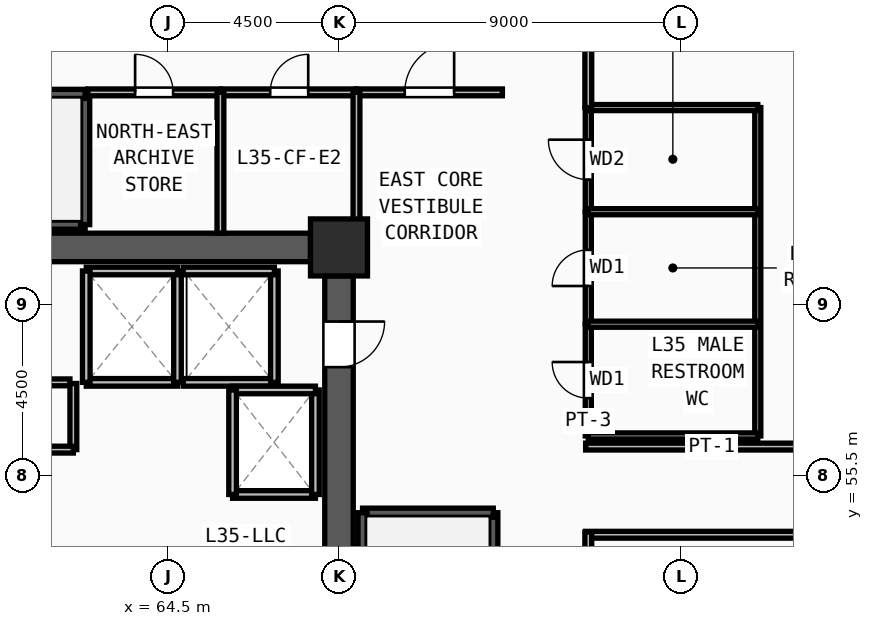
"""IFC4 building model, lengths in metres.
Left out: names, types, materials, properties, quantities, classifications, styles, units other than length and angle.
Written with IfcOpenShell. Run it as: python <this file> out.ifc"""

import sys

from ifc_helpers import new_model, si_unit, direction, frame, frame_2d, origin, origin_2d, place, context, subcontext, project, spatial, rectangle, extrude, source, transform, mapped, element, fill, save


model = new_model("IFC4")
c1 = context("Model", 3, precision=1e-05, world=origin(), true_north=direction((0.0, 1.0)))
c2 = subcontext(c1, "Body", "Model", "MODEL_VIEW")
j1 = project(units=[si_unit("LENGTHUNIT", "METRE"), si_unit("PLANEANGLEUNIT", "RADIAN")], contexts=[c1])
p1 = place(None, origin())
s1 = spatial("IfcSite", under=j1, at=p1, CompositionType="ELEMENT")
p2 = place(p1, origin())
s2 = spatial("IfcBuilding", under=s1, at=p2, CompositionType="ELEMENT")
p3 = place(p2, frame((0.0, 0.0, 135.75)))
s3 = spatial("IfcBuildingStorey", under=s2, at=p3, CompositionType="ELEMENT", Elevation=135.75)
m1 = source(origin(), c2, "Body", "SweptSolid", [
    extrude(rectangle(XDim=1.5, YDim=1.5, at=origin_2d()), origin(), (0.0, 0.0, 1.0), 3.75),
])
p4 = place(p3, frame((69.0, 61.5, 0.0), z_axis=(0.0, 0.0, 1.0), x_axis=(1.0, 0.0, 0.0)))
e1 = element("IfcColumn", 1, at=p4, inside=s3, PredefinedType="COLUMN", context=c2, shape_type="MappedRepresentation", body=[
    mapped(m1, transform((0.0, 0.0, 0.0), x_axis=(1.0, 0.0, 0.0), y_axis=(0.0, 1.0, 0.0), z_axis=(0.0, 0.0, 1.0), scale=1.0)),
])
p5 = place(p3, frame((60.75, 61.5, 0.0), z_axis=(0.0, 0.0, 1.0), x_axis=(1.0, 0.0, 0.0)))
e2 = element("IfcWall", 2, at=p5, inside=s3, PredefinedType="SHEAR", context=c2, shape_type="SweptSolid", body=[
    extrude(rectangle(XDim=7.5, YDim=0.75, at=frame_2d((3.75, 0.0))), origin(), (0.0, 0.0, 1.0), 3.47),
])
p6 = place(p3, frame((69.0, 60.75, 0.0), z_axis=(0.0, 0.0, 1.0), x_axis=(0.0, -1.0, 0.0)))
e3 = element("IfcWall", 3, at=p6, inside=s3, PredefinedType="SHEAR", context=c2, shape_type="SweptSolid", body=[
    extrude(rectangle(XDim=13.5, YDim=0.75, at=frame_2d((6.75, 0.0))), origin(), (0.0, 0.0, 1.0), 3.47),
])
m2 = source(origin(), c2, "Body", "SweptSolid", [
    extrude(rectangle(XDim=1.2, YDim=2.2, at=frame_2d((0.6, 1.1))), frame((0.0, 0.385, 0.0), z_axis=(0.0, -1.0, 0.0), x_axis=(1.0, 0.0, 0.0)), (0.0, 0.0, 1.0), 0.77),
])
p7 = place(p6, frame((1.2, 0.0, 0.0)))
e4 = element("IfcOpeningElement", 4, at=p7, cuts=e3, PredefinedType="OPENING", context=c2, shape_type="MappedRepresentation", body=[
    mapped(m2, transform((0.0, 0.0, 0.0), x_axis=(1.0, 0.0, 0.0), y_axis=(0.0, 1.0, 0.0), z_axis=(0.0, 0.0, 1.0), scale=1.0)),
])
p8 = place(p3, frame((73.06, 46.7, 0.0), z_axis=(0.0, 0.0, 1.0), x_axis=(0.0, 1.0, 0.0)))
e5 = element("IfcWall", 5, at=p8, inside=s3, PredefinedType="SOLIDWALL", context=c2, shape_type="SweptSolid", body=[
    extrude(rectangle(XDim=7.82, YDim=0.24, at=frame_2d((3.91, 0.0))), origin(), (0.0, 0.0, 1.0), 3.47),
])
m3 = source(origin(), c2, "Body", "SweptSolid", [
    extrude(rectangle(XDim=1.2, YDim=2.2, at=frame_2d((0.6, 1.1))), frame((0.0, 0.13, 0.0), z_axis=(0.0, -1.0, 0.0), x_axis=(1.0, 0.0, 0.0)), (0.0, 0.0, 1.0), 0.26),
])
p9 = place(p8, frame((0.32, 0.0, 0.0)))
e6 = element("IfcOpeningElement", 6, at=p9, cuts=e5, PredefinedType="OPENING", context=c2, shape_type="MappedRepresentation", body=[
    mapped(m3, transform((0.0, 0.0, 0.0), x_axis=(1.0, 0.0, 0.0), y_axis=(0.0, 1.0, 0.0), z_axis=(0.0, 0.0, 1.0), scale=1.0)),
])
p10 = place(p3, frame((73.06, 54.52, 0.0), z_axis=(0.0, 0.0, 1.0), x_axis=(-1.0, 0.0, 0.0)))
e7 = element("IfcWall", 7, at=p10, inside=s3, PredefinedType="SOLIDWALL", context=c2, shape_type="SweptSolid", body=[
    extrude(rectangle(XDim=3.44, YDim=0.24, at=frame_2d((1.72, 0.0))), origin(), (0.0, 0.0, 1.0), 3.47),
])
for number, where, z_axis, x_axis in (
    (8, (69.62, 54.52, 0.0), (0.0, 0.0, 1.0), (0.0, -1.0, 0.0)),
    (9, (54.5, 62.1, 0.0), (0.0, 0.0, 1.0), (1.0, 0.0, 0.0)),
):
    element("IfcWall", number, at=place(p3, frame(where, z_axis=z_axis, x_axis=x_axis)), inside=s3, PredefinedType="SOLIDWALL", context=c2, shape_type="SweptSolid", body=[
        extrude(rectangle(XDim=7.82, YDim=0.24, at=frame_2d((3.91, 0.0))), origin(), (0.0, 0.0, 1.0), 3.47),
    ])
p11 = place(p3, frame((62.32, 62.1, 0.0), z_axis=(0.0, 0.0, 1.0), x_axis=(0.0, 1.0, 0.0)))
e10 = element("IfcWall", 10, at=p11, inside=s3, PredefinedType="SOLIDWALL", context=c2, shape_type="SweptSolid", body=[
    extrude(rectangle(XDim=3.44, YDim=0.24, at=frame_2d((1.72, 0.0))), origin(), (0.0, 0.0, 1.0), 3.47),
])
p12 = place(p3, frame((62.32, 65.54, 0.0), z_axis=(0.0, 0.0, 1.0), x_axis=(-1.0, 0.0, 0.0)))
e11 = element("IfcWall", 11, at=p12, inside=s3, PredefinedType="SOLIDWALL", context=c2, shape_type="SweptSolid", body=[
    extrude(rectangle(XDim=7.82, YDim=0.24, at=frame_2d((3.91, 0.0))), origin(), (0.0, 0.0, 1.0), 3.47),
])
p13 = place(p12, frame((6.3, 0.0, 0.0)))
e12 = element("IfcOpeningElement", 12, at=p13, cuts=e11, PredefinedType="OPENING", context=c2, shape_type="MappedRepresentation", body=[
    mapped(m3, transform((0.0, 0.0, 0.0), x_axis=(1.0, 0.0, 0.0), y_axis=(0.0, 1.0, 0.0), z_axis=(0.0, 0.0, 1.0), scale=1.0)),
])
p14 = place(p3, frame((62.35, 57.95, 0.0), z_axis=(0.0, 0.0, 1.0), x_axis=(1.0, 0.0, 0.0)))
e13 = element("IfcWall", 13, at=p14, inside=s3, PredefinedType="SOLIDWALL", context=c2, shape_type="SweptSolid", body=[
    extrude(rectangle(XDim=2.4, YDim=0.2, at=frame_2d((1.2, 0.0))), origin(), (0.0, 0.0, 1.0), 3.47),
])
p15 = place(p3, frame((64.75, 57.95, 0.0), z_axis=(0.0, 0.0, 1.0), x_axis=(0.0, 1.0, 0.0)))
e14 = element("IfcWall", 14, at=p15, inside=s3, PredefinedType="SOLIDWALL", context=c2, shape_type="SweptSolid", body=[
    extrude(rectangle(XDim=2.93, YDim=0.2, at=frame_2d((1.465, 0.0))), origin(), (0.0, 0.0, 1.0), 3.47),
])
p16 = place(p3, frame((64.75, 60.88, 0.0), z_axis=(0.0, 0.0, 1.0), x_axis=(-1.0, 0.0, 0.0)))
e15 = element("IfcWall", 15, at=p16, inside=s3, PredefinedType="SOLIDWALL", context=c2, shape_type="SweptSolid", body=[
    extrude(rectangle(XDim=2.4, YDim=0.2, at=frame_2d((1.2, 0.0))), origin(), (0.0, 0.0, 1.0), 3.47),
])
p17 = place(p3, frame((62.35, 60.88, 0.0), z_axis=(0.0, 0.0, 1.0), x_axis=(0.0, -1.0, 0.0)))
e16 = element("IfcWall", 16, at=p17, inside=s3, PredefinedType="SOLIDWALL", context=c2, shape_type="SweptSolid", body=[
    extrude(rectangle(XDim=2.93, YDim=0.2, at=frame_2d((1.465, 0.0))), origin(), (0.0, 0.0, 1.0), 3.47),
])
p18 = place(p3, frame((64.9, 57.95, 0.0), z_axis=(0.0, 0.0, 1.0), x_axis=(1.0, 0.0, 0.0)))
e17 = element("IfcWall", 17, at=p18, inside=s3, PredefinedType="SOLIDWALL", context=c2, shape_type="SweptSolid", body=[
    extrude(rectangle(XDim=2.4, YDim=0.2, at=frame_2d((1.2, 0.0))), origin(), (0.0, 0.0, 1.0), 3.47),
])
p19 = place(p3, frame((67.3, 57.95, 0.0), z_axis=(0.0, 0.0, 1.0), x_axis=(0.0, 1.0, 0.0)))
e18 = element("IfcWall", 18, at=p19, inside=s3, PredefinedType="SOLIDWALL", context=c2, shape_type="SweptSolid", body=[
    extrude(rectangle(XDim=2.93, YDim=0.2, at=frame_2d((1.465, 0.0))), origin(), (0.0, 0.0, 1.0), 3.47),
])
p20 = place(p3, frame((67.3, 60.88, 0.0), z_axis=(0.0, 0.0, 1.0), x_axis=(-1.0, 0.0, 0.0)))
e19 = element("IfcWall", 19, at=p20, inside=s3, PredefinedType="SOLIDWALL", context=c2, shape_type="SweptSolid", body=[
    extrude(rectangle(XDim=2.4, YDim=0.2, at=frame_2d((1.2, 0.0))), origin(), (0.0, 0.0, 1.0), 3.47),
])
p21 = place(p3, frame((66.2, 55.0, 0.0), z_axis=(0.0, 0.0, 1.0), x_axis=(1.0, 0.0, 0.0)))
e20 = element("IfcWall", 20, at=p21, inside=s3, PredefinedType="SOLIDWALL", context=c2, shape_type="SweptSolid", body=[
    extrude(rectangle(XDim=2.18, YDim=0.2, at=frame_2d((1.09, 0.0))), origin(), (0.0, 0.0, 1.0), 3.47),
])
p22 = place(p3, frame((68.38, 55.0, 0.0), z_axis=(0.0, 0.0, 1.0), x_axis=(0.0, 1.0, 0.0)))
e21 = element("IfcWall", 21, at=p22, inside=s3, PredefinedType="SOLIDWALL", context=c2, shape_type="SweptSolid", body=[
    extrude(rectangle(XDim=2.75, YDim=0.2, at=frame_2d((1.375, 0.0))), origin(), (0.0, 0.0, 1.0), 3.47),
])
p23 = place(p3, frame((68.38, 57.75, 0.0), z_axis=(0.0, 0.0, 1.0), x_axis=(-1.0, 0.0, 0.0)))
e22 = element("IfcWall", 22, at=p23, inside=s3, PredefinedType="SOLIDWALL", context=c2, shape_type="SweptSolid", body=[
    extrude(rectangle(XDim=2.18, YDim=0.2, at=frame_2d((1.09, 0.0))), origin(), (0.0, 0.0, 1.0), 3.47),
])
p24 = place(p3, frame((66.2, 57.75, 0.0), z_axis=(0.0, 0.0, 1.0), x_axis=(0.0, -1.0, 0.0)))
e23 = element("IfcWall", 23, at=p24, inside=s3, PredefinedType="SOLIDWALL", context=c2, shape_type="SweptSolid", body=[
    extrude(rectangle(XDim=2.75, YDim=0.2, at=frame_2d((1.375, 0.0))), origin(), (0.0, 0.0, 1.0), 3.47),
])
p25 = place(p3, frame((59.81, 57.95, 0.0), z_axis=(0.0, 0.0, 1.0), x_axis=(1.0, 0.0, 0.0)))
e24 = element("IfcWall", 24, at=p25, inside=s3, PredefinedType="PARTITIONING", context=c2, shape_type="SweptSolid", body=[
    extrude(rectangle(XDim=2.11, YDim=0.18, at=frame_2d((1.055, 0.0))), origin(), (0.0, 0.0, 1.0), 3.47),
])
m4 = source(origin(), c2, "Body", "SweptSolid", [
    extrude(rectangle(XDim=0.85, YDim=2.1, at=frame_2d((0.425, 1.05))), frame((0.0, 0.1, 0.0), z_axis=(0.0, -1.0, 0.0), x_axis=(1.0, 0.0, 0.0)), (0.0, 0.0, 1.0), 0.2),
])
p26 = place(p25, frame((0.635, 0.0, 0.0)))
e25 = element("IfcOpeningElement", 25, at=p26, cuts=e24, PredefinedType="OPENING", context=c2, shape_type="MappedRepresentation", body=[
    mapped(m4, transform((0.0, 0.0, 0.0), x_axis=(1.0, 0.0, 0.0), y_axis=(0.0, 1.0, 0.0), z_axis=(0.0, 0.0, 1.0), scale=1.0)),
])
p27 = place(p3, frame((75.56, 56.54, 0.0), z_axis=(0.0, 0.0, 1.0), x_axis=(0.0, 1.0, 0.0)))
e26 = element("IfcWall", 26, at=p27, inside=s3, PredefinedType="PARTITIONING", context=c2, shape_type="SweptSolid", body=[
    extrude(rectangle(XDim=2.94, YDim=0.16, at=frame_2d((1.47, 0.0))), origin(), (0.0, 0.0, 1.0), 3.47),
])
m5 = source(origin(), c2, "Body", "SweptSolid", [
    extrude(rectangle(XDim=0.95, YDim=2.15, at=frame_2d((0.475, 1.075))), frame((0.0, 0.09, 0.0), z_axis=(0.0, -1.0, 0.0), x_axis=(1.0, 0.0, 0.0)), (0.0, 0.0, 1.0), 0.18),
])
p28 = place(p27, frame((0.995, 0.0, 0.0)))
e27 = element("IfcOpeningElement", 27, at=p28, cuts=e26, PredefinedType="OPENING", context=c2, shape_type="MappedRepresentation", body=[
    mapped(m5, transform((0.0, 0.0, 0.0), x_axis=(1.0, 0.0, 0.0), y_axis=(0.0, 1.0, 0.0), z_axis=(0.0, 0.0, 1.0), scale=1.0)),
])
p29 = place(p3, frame((75.56, 59.48, 0.0), z_axis=(0.0, 0.0, 1.0), x_axis=(0.0, 1.0, 0.0)))
e28 = element("IfcWall", 28, at=p29, inside=s3, PredefinedType="PARTITIONING", context=c2, shape_type="SweptSolid", body=[
    extrude(rectangle(XDim=2.96, YDim=0.16, at=frame_2d((1.48, 0.0))), origin(), (0.0, 0.0, 1.0), 3.47),
])
p30 = place(p29, frame((1.005, 0.0, 0.0)))
e29 = element("IfcOpeningElement", 29, at=p30, cuts=e28, PredefinedType="OPENING", context=c2, shape_type="MappedRepresentation", body=[
    mapped(m5, transform((0.0, 0.0, 0.0), x_axis=(1.0, 0.0, 0.0), y_axis=(0.0, 1.0, 0.0), z_axis=(0.0, 0.0, 1.0), scale=1.0)),
])
p31 = place(p3, frame((75.56, 62.44, 0.0), z_axis=(0.0, 0.0, 1.0), x_axis=(0.0, 1.0, 0.0)))
e30 = element("IfcWall", 30, at=p31, inside=s3, PredefinedType="PARTITIONING", context=c2, shape_type="SweptSolid", body=[
    extrude(rectangle(XDim=2.74, YDim=0.16, at=frame_2d((1.37, 0.0))), origin(), (0.0, 0.0, 1.0), 3.47),
])
m6 = source(origin(), c2, "Body", "SweptSolid", [
    extrude(rectangle(XDim=1.05, YDim=2.15, at=frame_2d((0.525, 1.075))), frame((0.0, 0.09, 0.0), z_axis=(0.0, -1.0, 0.0), x_axis=(1.0, 0.0, 0.0)), (0.0, 0.0, 1.0), 0.18),
])
p32 = place(p31, frame((0.845, 0.0, 0.0)))
e31 = element("IfcOpeningElement", 31, at=p32, cuts=e30, PredefinedType="OPENING", context=c2, shape_type="MappedRepresentation", body=[
    mapped(m6, transform((0.0, 0.0, 0.0), x_axis=(1.0, 0.0, 0.0), y_axis=(0.0, 1.0, 0.0), z_axis=(0.0, 0.0, 1.0), scale=1.0)),
])
p33 = place(p3, frame((62.39, 65.58, 0.0), z_axis=(0.0, 0.0, 1.0), x_axis=(1.0, 0.0, 0.0)))
e32 = element("IfcWall", 32, at=p33, inside=s3, PredefinedType="PARTITIONING", context=c2, shape_type="SweptSolid", body=[
    extrude(rectangle(XDim=3.49, YDim=0.18, at=frame_2d((1.745, 0.0))), origin(), (0.0, 0.0, 1.0), 3.47),
])
m7 = source(origin(), c2, "Body", "SweptSolid", [
    extrude(rectangle(XDim=1.0, YDim=2.2, at=frame_2d((0.5, 1.1))), frame((0.0, 0.1, 0.0), z_axis=(0.0, -1.0, 0.0), x_axis=(1.0, 0.0, 0.0)), (0.0, 0.0, 1.0), 0.2),
])
p34 = place(p33, frame((1.245, 0.0, 0.0)))
e33 = element("IfcOpeningElement", 33, at=p34, cuts=e32, PredefinedType="OPENING", context=c2, shape_type="MappedRepresentation", body=[
    mapped(m7, transform((0.0, 0.0, 0.0), x_axis=(1.0, 0.0, 0.0), y_axis=(0.0, 1.0, 0.0), z_axis=(0.0, 0.0, 1.0), scale=1.0)),
])
p35 = place(p3, frame((65.92, 65.58, 0.0), z_axis=(0.0, 0.0, 1.0), x_axis=(1.0, 0.0, 0.0)))
e34 = element("IfcWall", 34, at=p35, inside=s3, PredefinedType="PARTITIONING", context=c2, shape_type="SweptSolid", body=[
    extrude(rectangle(XDim=3.54, YDim=0.18, at=frame_2d((1.77, 0.0))), origin(), (0.0, 0.0, 1.0), 3.47),
])
p36 = place(p35, frame((1.27, 0.0, 0.0)))
e35 = element("IfcOpeningElement", 35, at=p36, cuts=e34, PredefinedType="OPENING", context=c2, shape_type="MappedRepresentation", body=[
    mapped(m7, transform((0.0, 0.0, 0.0), x_axis=(1.0, 0.0, 0.0), y_axis=(0.0, 1.0, 0.0), z_axis=(0.0, 0.0, 1.0), scale=1.0)),
])
p37 = place(p3, frame((69.46, 65.58, 0.0), z_axis=(0.0, 0.0, 1.0), x_axis=(1.0, 0.0, 0.0)))
e36 = element("IfcWall", 36, at=p37, inside=s3, PredefinedType="PARTITIONING", context=c2, shape_type="SweptSolid", body=[
    extrude(rectangle(XDim=3.84, YDim=0.18, at=frame_2d((1.92, 0.0))), origin(), (0.0, 0.0, 1.0), 3.47),
])
m8 = source(origin(), c2, "Body", "SweptSolid", [
    extrude(rectangle(XDim=1.3, YDim=2.2, at=frame_2d((0.65, 1.1))), frame((0.0, 0.1, 0.0), z_axis=(0.0, -1.0, 0.0), x_axis=(1.0, 0.0, 0.0)), (0.0, 0.0, 1.0), 0.2),
])
p38 = place(p37, frame((1.27, 0.0, 0.0)))
e37 = element("IfcOpeningElement", 37, at=p38, cuts=e36, PredefinedType="OPENING", context=c2, shape_type="MappedRepresentation", body=[
    mapped(m8, transform((0.0, 0.0, 0.0), x_axis=(1.0, 0.0, 0.0), y_axis=(0.0, 1.0, 0.0), z_axis=(0.0, 0.0, 1.0), scale=1.0)),
])
p39 = place(p3, frame((75.49, 56.26, 0.0), z_axis=(0.0, 0.0, 1.0), x_axis=(1.0, 0.0, 0.0)))
e38 = element("IfcWall", 38, at=p39, inside=s3, PredefinedType="PARTITIONING", context=c2, shape_type="SweptSolid", body=[
    extrude(rectangle(XDim=15.268, YDim=0.18, at=frame_2d((7.634, 0.0))), origin(), (0.0, 0.0, 1.0), 3.47),
])
m9 = source(origin(), c2, "Body", "SweptSolid", [
    extrude(rectangle(XDim=1.5, YDim=2.2, at=frame_2d((0.75, 1.1))), frame((0.0, 0.1, 0.0), z_axis=(0.0, -1.0, 0.0), x_axis=(1.0, 0.0, 0.0)), (0.0, 0.0, 1.0), 0.2),
])
p40 = place(p39, frame((6.884, 0.0, 0.0)))
e39 = element("IfcOpeningElement", 39, at=p40, cuts=e38, PredefinedType="OPENING", context=c2, shape_type="MappedRepresentation", body=[
    mapped(m9, transform((0.0, 0.0, 0.0), x_axis=(1.0, 0.0, 0.0), y_axis=(0.0, 1.0, 0.0), z_axis=(0.0, 0.0, 1.0), scale=1.0)),
])
p41 = place(p3, frame((89.629, 53.94, 0.0), z_axis=(0.0, 0.0, 1.0), x_axis=(-1.0, 0.0, 0.0)))
e40 = element("IfcWall", 40, at=p41, inside=s3, PredefinedType="PARTITIONING", context=c2, shape_type="SweptSolid", body=[
    extrude(rectangle(XDim=14.139, YDim=0.18, at=frame_2d((7.069, 0.0))), origin(), (0.0, 0.0, 1.0), 3.47),
])
p42 = place(p41, frame((6.57, 0.0, 0.0)))
e41 = element("IfcOpeningElement", 41, at=p42, cuts=e40, PredefinedType="OPENING", context=c2, shape_type="MappedRepresentation", body=[
    mapped(m7, transform((0.0, 0.0, 0.0), x_axis=(1.0, 0.0, 0.0), y_axis=(0.0, 1.0, 0.0), z_axis=(0.0, 0.0, 1.0), scale=1.0)),
])
p43 = place(p3, frame((62.01, 56.18, 0.0), z_axis=(0.0, 0.0, 1.0), x_axis=(0.0, 1.0, 0.0)))
e42 = element("IfcWall", 42, at=p43, inside=s3, PredefinedType="PARTITIONING", context=c2, shape_type="SweptSolid", body=[
    extrude(rectangle(XDim=1.74, YDim=0.18, at=frame_2d((0.87, 0.0))), origin(), (0.0, 0.0, 1.0), 3.47),
])
p44 = place(p3, frame((59.72, 56.18, 0.0), z_axis=(0.0, 0.0, 1.0), x_axis=(1.0, 0.0, 0.0)))
e43 = element("IfcWall", 43, at=p44, inside=s3, PredefinedType="PARTITIONING", context=c2, shape_type="SweptSolid", body=[
    extrude(rectangle(XDim=2.29, YDim=0.18, at=frame_2d((1.145, 0.0))), origin(), (0.0, 0.0, 1.0), 3.47),
])
p45 = place(p3, frame((80.02, 56.54, 0.0), z_axis=(0.0, 0.0, 1.0), x_axis=(0.0, 1.0, 0.0)))
e44 = element("IfcWall", 44, at=p45, inside=s3, PredefinedType="PARTITIONING", context=c2, shape_type="SweptSolid", body=[
    extrude(rectangle(XDim=8.64, YDim=0.16, at=frame_2d((4.32, 0.0))), origin(), (0.0, 0.0, 1.0), 3.055),
])
for number, where, z_axis, x_axis in (
    (45, (75.56, 56.54, 0.0), (0.0, 0.0, 1.0), (1.0, 0.0, 0.0)),
    (46, (75.56, 59.48, 0.0), (0.0, 0.0, 1.0), (1.0, 0.0, 0.0)),
    (47, (75.56, 62.44, 0.0), (0.0, 0.0, 1.0), (1.0, 0.0, 0.0)),
    (48, (75.56, 65.18, 0.0), (0.0, 0.0, 1.0), (1.0, 0.0, 0.0)),
):
    element("IfcWall", number, at=place(p3, frame(where, z_axis=z_axis, x_axis=x_axis)), inside=s3, PredefinedType="PARTITIONING", context=c2, shape_type="SweptSolid", body=[
        extrude(rectangle(XDim=4.46, YDim=0.16, at=frame_2d((2.23, 0.0))), origin(), (0.0, 0.0, 1.0), 3.47),
    ])
p46 = place(p3, frame((65.88, 61.875, 0.0), z_axis=(0.0, 0.0, 1.0), x_axis=(0.0, 1.0, 0.0)))
e49 = element("IfcWall", 49, at=p46, inside=s3, PredefinedType="PARTITIONING", context=c2, shape_type="SweptSolid", body=[
    extrude(rectangle(XDim=3.705, YDim=0.18, at=frame_2d((1.853, 0.0))), origin(), (0.0, 0.0, 1.0), 3.47),
])
p47 = place(p3, frame((69.46, 61.95, 0.0), z_axis=(0.0, 0.0, 1.0), x_axis=(0.0, 1.0, 0.0)))
e50 = element("IfcWall", 50, at=p47, inside=s3, PredefinedType="PARTITIONING", context=c2, shape_type="SweptSolid", body=[
    extrude(rectangle(XDim=3.63, YDim=0.18, at=frame_2d((1.815, 0.0))), origin(), (0.0, 0.0, 1.0), 3.47),
])
p48 = place(p3, frame((75.56, 67.215, 0.0), z_axis=(0.0, 0.0, 1.0), x_axis=(0.0, -1.0, 0.0)))
e51 = element("IfcWall", 51, at=p48, inside=s3, PredefinedType="PARTITIONING", context=c2, shape_type="SweptSolid", body=[
    extrude(rectangle(XDim=2.035, YDim=0.18, at=frame_2d((1.018, 0.0))), origin(), (0.0, 0.0, 1.0), 3.47),
])
p49 = place(p3, frame((75.56, 54.01, 0.0), z_axis=(0.0, 0.0, 1.0), x_axis=(0.0, -1.0, 0.0)))
e52 = element("IfcWall", 52, at=p49, inside=s3, PredefinedType="PARTITIONING", context=c2, shape_type="SweptSolid", body=[
    extrude(rectangle(XDim=7.295, YDim=0.18, at=frame_2d((3.647, 0.0))), origin(), (0.0, 0.0, 1.0), 3.47),
])
m10 = source(origin(), c2, "Body", "SweptSolid", [
    extrude(rectangle(XDim=1.2, YDim=2.2, at=frame_2d((0.6, 1.1))), frame((0.0, 0.025, 0.0), z_axis=(0.0, -1.0, 0.0), x_axis=(1.0, 0.0, 0.0)), (0.0, 0.0, 1.0), 0.05),
])
p50 = place(p7, origin())
e53 = element("IfcDoor", 53, at=p50, inside=s3, OperationType="SINGLE_SWING_LEFT", PredefinedType="DOOR", context=c2, shape_type="MappedRepresentation", body=[
    mapped(m10, transform((0.0, 0.0, 0.0), x_axis=(1.0, 0.0, 0.0), y_axis=(0.0, 1.0, 0.0), z_axis=(0.0, 0.0, 1.0), scale=1.0)),
])
fill(e4, e53)
m11 = source(origin(), c2, "Body", "SweptSolid", [
    extrude(rectangle(XDim=0.95, YDim=2.15, at=frame_2d((0.475, 1.075))), frame((0.0, 0.025, 0.0), z_axis=(0.0, -1.0, 0.0), x_axis=(1.0, 0.0, 0.0)), (0.0, 0.0, 1.0), 0.05),
])
p51 = place(p28, origin())
e54 = element("IfcDoor", 54, at=p51, inside=s3, OperationType="SINGLE_SWING_RIGHT", PredefinedType="DOOR", context=c2, shape_type="MappedRepresentation", body=[
    mapped(m11, transform((0.0, 0.0, 0.0), x_axis=(1.0, 0.0, 0.0), y_axis=(0.0, 1.0, 0.0), z_axis=(0.0, 0.0, 1.0), scale=1.0)),
])
fill(e27, e54)
p52 = place(p30, origin())
e55 = element("IfcDoor", 55, at=p52, inside=s3, OperationType="SINGLE_SWING_LEFT", PredefinedType="DOOR", context=c2, shape_type="MappedRepresentation", body=[
    mapped(m11, transform((0.0, 0.0, 0.0), x_axis=(1.0, 0.0, 0.0), y_axis=(0.0, 1.0, 0.0), z_axis=(0.0, 0.0, 1.0), scale=1.0)),
])
fill(e29, e55)
m12 = source(origin(), c2, "Body", "SweptSolid", [
    extrude(rectangle(XDim=1.05, YDim=2.15, at=frame_2d((0.525, 1.075))), frame((0.0, 0.025, 0.0), z_axis=(0.0, -1.0, 0.0), x_axis=(1.0, 0.0, 0.0)), (0.0, 0.0, 1.0), 0.05),
])
p53 = place(p32, origin())
e56 = element("IfcDoor", 56, at=p53, inside=s3, OperationType="SINGLE_SWING_RIGHT", PredefinedType="DOOR", context=c2, shape_type="MappedRepresentation", body=[
    mapped(m12, transform((0.0, 0.0, 0.0), x_axis=(1.0, 0.0, 0.0), y_axis=(0.0, 1.0, 0.0), z_axis=(0.0, 0.0, 1.0), scale=1.0)),
])
fill(e31, e56)
m13 = source(origin(), c2, "Body", "SweptSolid", [
    extrude(rectangle(XDim=1.0, YDim=2.2, at=frame_2d((0.5, 1.1))), frame((0.0, 0.025, 0.0), z_axis=(0.0, -1.0, 0.0), x_axis=(1.0, 0.0, 0.0)), (0.0, 0.0, 1.0), 0.05),
])
p54 = place(p34, origin())
e57 = element("IfcDoor", 57, at=p54, inside=s3, OperationType="SINGLE_SWING_LEFT", PredefinedType="DOOR", context=c2, shape_type="MappedRepresentation", body=[
    mapped(m13, transform((0.0, 0.0, 0.0), x_axis=(1.0, 0.0, 0.0), y_axis=(0.0, 1.0, 0.0), z_axis=(0.0, 0.0, 1.0), scale=1.0)),
])
fill(e33, e57)
p55 = place(p36, origin())
e58 = element("IfcDoor", 58, at=p55, inside=s3, OperationType="SINGLE_SWING_RIGHT", PredefinedType="DOOR", context=c2, shape_type="MappedRepresentation", body=[
    mapped(m13, transform((0.0, 0.0, 0.0), x_axis=(1.0, 0.0, 0.0), y_axis=(0.0, 1.0, 0.0), z_axis=(0.0, 0.0, 1.0), scale=1.0)),
])
fill(e35, e58)
m14 = source(origin(), c2, "Body", "SweptSolid", [
    extrude(rectangle(XDim=1.3, YDim=2.2, at=frame_2d((0.65, 1.1))), frame((0.0, 0.025, 0.0), z_axis=(0.0, -1.0, 0.0), x_axis=(1.0, 0.0, 0.0)), (0.0, 0.0, 1.0), 0.05),
])
p56 = place(p38, origin())
e59 = element("IfcDoor", 59, at=p56, inside=s3, OperationType="SINGLE_SWING_RIGHT", PredefinedType="DOOR", context=c2, shape_type="MappedRepresentation", body=[
    mapped(m14, transform((0.0, 0.0, 0.0), x_axis=(1.0, 0.0, 0.0), y_axis=(0.0, 1.0, 0.0), z_axis=(0.0, 0.0, 1.0), scale=1.0)),
])
fill(e37, e59)
save(model, sys.argv[1])
